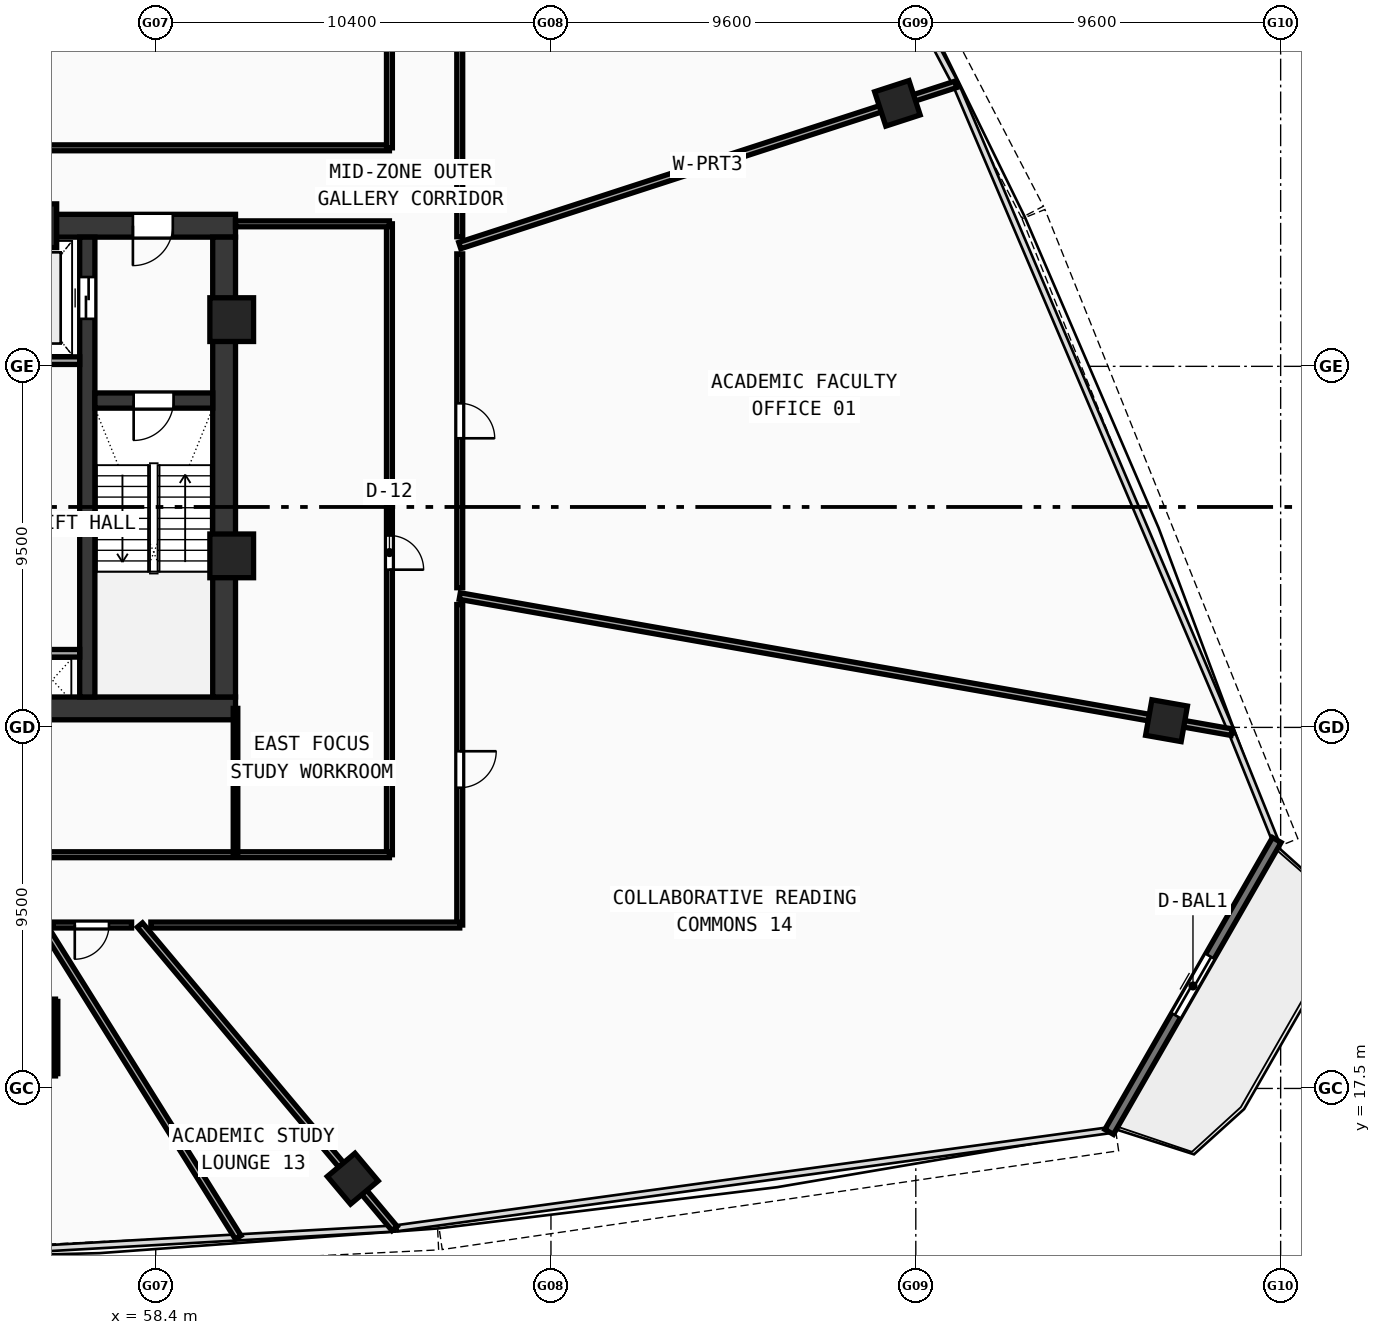
"""IFC4 building model, lengths in metres.
Left out: names, types, materials, properties, quantities, classifications, styles, units other than length and angle.
Written with IfcOpenShell. Run it as: python <this file> out.ifc"""

import sys

from ifc_helpers import new_model, si_unit, direction, frame, frame_2d, origin, origin_with_axes, origin_2d, place, context, subcontext, project, spatial, rectangle, hollow_rectangle, extrude, source, transform, mapped, element, fill, save


model = new_model("IFC4")
c1 = context("Model", 3, precision=1e-05, world=origin(), true_north=direction((0.0, 1.0)))
c2 = subcontext(c1, "Body", "Model", "MODEL_VIEW")
j1 = project(units=[si_unit("LENGTHUNIT", "METRE"), si_unit("PLANEANGLEUNIT", "RADIAN")], contexts=[c1])
p1 = place(None, origin())
s1 = spatial("IfcSite", under=j1, at=p1, CompositionType="ELEMENT")
p2 = place(p1, origin())
s2 = spatial("IfcBuilding", under=s1, at=p2, CompositionType="ELEMENT")
p3 = place(p2, frame((0.0, 0.0, 144.55)))
s3 = spatial("IfcBuildingStorey", under=s2, at=p3, CompositionType="ELEMENT", Elevation=144.55)
p4 = place(p3, frame((35.5, 27.5, 0.0), z_axis=(0.0, 0.0, 1.0), x_axis=(1.0, 0.0, 0.0)))
e1 = element("IfcWall", 1, at=p4, inside=s3, PredefinedType="SHEAR", context=c2, shape_type="SweptSolid", body=[
    extrude(rectangle(XDim=25.0, YDim=0.6, at=frame_2d((12.5, 0.0))), origin(), (0.0, 0.0, 1.0), 3.42),
])
p5 = place(p3, frame((49.2, 40.2, 0.0), z_axis=(0.0, 0.0, 1.0), x_axis=(1.0, 0.0, 0.0)))
e2 = element("IfcWall", 2, at=p5, inside=s3, PredefinedType="SHEAR", context=c2, shape_type="SweptSolid", body=[
    extrude(rectangle(XDim=11.3, YDim=0.6, at=frame_2d((5.65, 0.0))), origin(), (0.0, 0.0, 1.0), 3.42),
])
p6 = place(p5, frame((8.6, 0.0, 0.0)))
e3 = element("IfcOpeningElement", 3, at=p6, cuts=e2, PredefinedType="OPENING", context=c2, shape_type="SweptSolid", body=[
    extrude(rectangle(XDim=1.05, YDim=2.1, at=frame_2d((0.525, 1.05))), frame((0.0, 0.31, 0.0), z_axis=(0.0, -1.0, 0.0), x_axis=(1.0, 0.0, 0.0)), (0.0, 0.0, 1.0), 0.62),
])
p7 = place(p3, frame((60.2, 27.8, 0.0), z_axis=(0.0, 0.0, 1.0), x_axis=(0.0, 1.0, 0.0)))
e4 = element("IfcWall", 4, at=p7, inside=s3, PredefinedType="SHEAR", context=c2, shape_type="SweptSolid", body=[
    extrude(rectangle(XDim=12.1, YDim=0.6, at=frame_2d((6.05, 0.0))), origin(), (0.0, 0.0, 1.0), 3.42),
])
p8 = place(p3, frame((56.6, 27.8, 0.0), z_axis=(0.0, 0.0, 1.0), x_axis=(0.0, 1.0, 0.0)))
e5 = element("IfcWall", 5, at=p8, inside=s3, PredefinedType="SHEAR", context=c2, shape_type="SweptSolid", body=[
    extrude(rectangle(XDim=12.1, YDim=0.4, at=frame_2d((6.05, 0.0))), origin(), (0.0, 0.0, 1.0), 3.42),
])
p9 = place(p8, frame((9.95, 0.0, 0.0)))
e6 = element("IfcOpeningElement", 6, at=p9, cuts=e5, PredefinedType="OPENING", context=c2, shape_type="SweptSolid", body=[
    extrude(rectangle(XDim=1.1, YDim=2.1, at=frame_2d((0.55, 1.05))), frame((0.0, 0.21, 0.0), z_axis=(0.0, -1.0, 0.0), x_axis=(1.0, 0.0, 0.0)), (0.0, 0.0, 1.0), 0.42),
])
p10 = place(p3, frame((56.8, 35.6, 0.0), z_axis=(0.0, 0.0, 1.0), x_axis=(1.0, 0.0, 0.0)))
e7 = element("IfcWall", 7, at=p10, inside=s3, PredefinedType="SHEAR", context=c2, shape_type="SweptSolid", body=[
    extrude(rectangle(XDim=3.1, YDim=0.4, at=frame_2d((1.55, 0.0))), origin(), (0.0, 0.0, 1.0), 3.42),
])
p11 = place(p10, frame((1.02, 0.0, 0.0)))
e8 = element("IfcOpeningElement", 8, at=p11, cuts=e7, PredefinedType="OPENING", context=c2, shape_type="SweptSolid", body=[
    extrude(rectangle(XDim=1.05, YDim=2.1, at=frame_2d((0.525, 1.05))), frame((0.0, 0.21, 0.0), z_axis=(0.0, -1.0, 0.0), x_axis=(1.0, 0.0, 0.0)), (0.0, 0.0, 1.0), 0.42),
])
m1 = source(origin(), c2, "Body", "SweptSolid", [
    extrude(hollow_rectangle(XDim=1.15, YDim=1.15, WallThickness=0.048, at=origin_2d()), origin(), (0.0, 0.0, 1.0), 3.68),
])
for number, where, z_axis, x_axis in (
    (9, (60.4, 31.513, -0.26), (0.0, 0.0, 1.0), (1.0, 0.0, 0.0)),
    (10, (60.4, 37.729, -0.26), (0.0, 0.0, 1.0), (1.0, 0.0, 0.0)),
    (11, (55.219, 40.2, -0.26), (0.0, 0.0, 1.0), (1.0, 0.0, 0.0)),
):
    element("IfcColumn", number, at=place(p3, frame(where, z_axis=z_axis, x_axis=x_axis)), inside=s3, PredefinedType="COLUMN", context=c2, shape_type="MappedRepresentation", body=[
        mapped(m1, transform((0.0, 0.0, 0.0), scale=1.0)),
    ])
m2 = source(origin(), c2, "Body", "SweptSolid", [
    extrude(hollow_rectangle(XDim=0.95, YDim=0.95, WallThickness=0.04, at=origin_2d()), origin(), (0.0, 0.0, 1.0), 3.68),
])
for number, where, z_axis, x_axis in (
    (12, (63.585, 15.126, -0.26), (0.0, 0.0, 1.0), (0.766, 0.643, 0.0)),
    (13, (84.997, 27.177, -0.26), (0.0, 0.0, 1.0), (0.174, 0.985, 0.0)),
    (14, (77.915, 43.42, -0.26), (0.0, 0.0, 1.0), (-0.309, 0.951, 0.0)),
):
    element("IfcColumn", number, at=place(p3, frame(where, z_axis=z_axis, x_axis=x_axis)), inside=s3, PredefinedType="COLUMN", context=c2, shape_type="MappedRepresentation", body=[
        mapped(m2, transform((0.0, 0.0, 0.0), scale=1.0)),
    ])
p12 = place(p3, frame((83.488, 16.356, 0.0), z_axis=(0.0, 0.0, 1.0), x_axis=(0.497915888941, 0.867225326856, 0.0)))
e15 = element("IfcWall", 15, at=p12, inside=s3, PredefinedType="STANDARD", context=c2, shape_type="SweptSolid", body=[
    extrude(rectangle(XDim=8.858, YDim=0.26, at=frame_2d((4.429, 0.0))), origin(), (0.0, 0.0, 1.0), 3.42),
])
p13 = place(p12, frame((3.529, 0.0, 0.0)))
e16 = element("IfcOpeningElement", 16, at=p13, cuts=e15, PredefinedType="OPENING", context=c2, shape_type="SweptSolid", body=[
    extrude(rectangle(XDim=1.8, YDim=2.15, at=frame_2d((0.9, 1.075))), frame((0.0, 0.14, 0.0), z_axis=(0.0, -1.0, 0.0), x_axis=(1.0, 0.0, 0.0)), (0.0, 0.0, 1.0), 0.28),
])
p14 = place(p3, frame((53.68, 36.65, 0.0), z_axis=(0.0, 0.0, 1.0), x_axis=(1.0, 0.0, 0.0)))
e17 = element("IfcWall", 17, at=p14, inside=s3, PredefinedType="SOLIDWALL", context=c2, shape_type="SweptSolid", body=[
    extrude(rectangle(XDim=2.72, YDim=0.2, at=frame_2d((1.36, 0.0))), origin(), (0.0, 0.0, 1.0), 3.42),
])
p15 = place(p3, frame((55.12, 28.95, 0.0), z_axis=(0.0, 0.0, 1.0), x_axis=(1.0, 0.0, 0.0)))
e18 = element("IfcWall", 18, at=p15, inside=s3, PredefinedType="SOLIDWALL", context=c2, shape_type="SweptSolid", body=[
    extrude(rectangle(XDim=1.28, YDim=0.2, at=frame_2d((0.64, 0.0))), origin(), (0.0, 0.0, 1.0), 3.42),
])
p16 = place(p3, frame((31.45, 42.25, 0.0), z_axis=(0.0, 0.0, 1.0), x_axis=(1.0, 0.0, 0.0)))
e19 = element("IfcWall", 19, at=p16, inside=s3, PredefinedType="PARTITIONING", context=c2, shape_type="SweptSolid", body=[
    extrude(rectangle(XDim=33.1, YDim=0.155, at=frame_2d((16.55, 0.0))), origin(), (0.0, 0.0, 1.0), 2.77),
])
p17 = place(p3, frame((64.55, 42.25, 0.0), z_axis=(0.0, 0.0, 1.0), x_axis=(0.0, 1.0, 0.0)))
e20 = element("IfcWall", 20, at=p17, inside=s3, PredefinedType="PARTITIONING", context=c2, shape_type="SweptSolid", body=[
    extrude(rectangle(XDim=11.7, YDim=0.155, at=frame_2d((5.85, 0.0))), origin(), (0.0, 0.0, 1.0), 2.77),
])
p18 = place(p3, frame((64.55, 23.65, 0.0), z_axis=(0.0, 0.0, 1.0), x_axis=(0.0, 1.0, 0.0)))
e21 = element("IfcWall", 21, at=p18, inside=s3, PredefinedType="PARTITIONING", context=c2, shape_type="SweptSolid", body=[
    extrude(rectangle(XDim=16.6, YDim=0.155, at=frame_2d((8.3, 0.0))), origin(), (0.0, 0.0, 1.0), 2.77),
])
p19 = place(p18, frame((7.5, 0.0, 0.0)))
e22 = element("IfcOpeningElement", 22, at=p19, cuts=e21, PredefinedType="OPENING", context=c2, shape_type="SweptSolid", body=[
    extrude(rectangle(XDim=0.9, YDim=2.08, at=frame_2d((0.45, 1.04))), frame((0.0, 0.087, 0.0), z_axis=(0.0, -1.0, 0.0), x_axis=(1.0, 0.0, 0.0)), (0.0, 0.0, 1.0), 0.175),
])
p20 = place(p3, frame((31.45, 23.65, 0.0), z_axis=(0.0, 0.0, 1.0), x_axis=(1.0, 0.0, 0.0)))
e23 = element("IfcWall", 23, at=p20, inside=s3, PredefinedType="PARTITIONING", context=c2, shape_type="SweptSolid", body=[
    extrude(rectangle(XDim=33.1, YDim=0.155, at=frame_2d((16.55, 0.0))), origin(), (0.0, 0.0, 1.0), 2.77),
])
p21 = place(p20, frame((16.0, 0.0, 0.0)))
e24 = element("IfcOpeningElement", 24, at=p21, cuts=e23, PredefinedType="OPENING", context=c2, shape_type="SweptSolid", body=[
    extrude(rectangle(XDim=0.92, YDim=2.1, at=frame_2d((0.46, 1.05))), frame((0.0, 0.087, 0.0), z_axis=(0.0, -1.0, 0.0), x_axis=(1.0, 0.0, 0.0)), (0.0, 0.0, 1.0), 0.175),
])
p22 = place(p3, frame((60.5, 40.25, 0.0), z_axis=(0.0, 0.0, 1.0), x_axis=(1.0, 0.0, 0.0)))
e25 = element("IfcWall", 25, at=p22, inside=s3, PredefinedType="PARTITIONING", context=c2, shape_type="SweptSolid", body=[
    extrude(rectangle(XDim=4.05, YDim=0.155, at=frame_2d((2.025, 0.0))), origin(), (0.0, 0.0, 1.0), 3.42),
])
p23 = place(p3, frame((60.5, 23.65, 0.0), z_axis=(0.0, 0.0, 1.0), x_axis=(0.0, 1.0, 0.0)))
e26 = element("IfcWall", 26, at=p23, inside=s3, PredefinedType="PARTITIONING", context=c2, shape_type="SweptSolid", body=[
    extrude(rectangle(XDim=3.85, YDim=0.12, at=frame_2d((1.925, 0.0))), origin(), (0.0, 0.0, 1.0), 3.02),
])
p24 = place(p3, frame((66.4, 39.678, 0.0), z_axis=(0.0, 0.0, 1.0), x_axis=(0.951057598357, 0.309013664112, 0.0)))
e27 = element("IfcWall", 27, at=p24, inside=s3, PredefinedType="PARTITIONING", context=c2, shape_type="SweptSolid", body=[
    extrude(rectangle(XDim=13.723, YDim=0.175, at=frame_2d((6.862, 0.0))), origin(), (0.0, 0.0, 1.0), 2.77),
])
p25 = place(p3, frame((55.436, 21.8, 0.0), z_axis=(0.0, 0.0, 1.0), x_axis=(0.529931002604, -0.848040761096, 0.0)))
e28 = element("IfcWall", 28, at=p25, inside=s3, PredefinedType="PARTITIONING", context=c2, shape_type="SweptSolid", body=[
    extrude(rectangle(XDim=9.691, YDim=0.175, at=frame_2d((4.845, 0.0))), origin(), (0.0, 0.0, 1.0), 2.77),
])
p26 = place(p3, frame((57.985, 21.8, 0.0), z_axis=(0.0, 0.0, 1.0), x_axis=(0.642781677101, -0.76604942111, 0.0)))
e29 = element("IfcWall", 29, at=p26, inside=s3, PredefinedType="PARTITIONING", context=c2, shape_type="SweptSolid", body=[
    extrude(rectangle(XDim=10.424, YDim=0.175, at=frame_2d((5.212, 0.0))), origin(), (0.0, 0.0, 1.0), 2.77),
])
p27 = place(p3, frame((66.4, 30.456, 0.0), z_axis=(0.0, 0.0, 1.0), x_axis=(0.984807623882, -0.173648909998, 0.0)))
e30 = element("IfcWall", 30, at=p27, inside=s3, PredefinedType="PARTITIONING", context=c2, shape_type="SweptSolid", body=[
    extrude(rectangle(XDim=20.622, YDim=0.175, at=frame_2d((10.311, 0.0))), origin(), (0.0, 0.0, 1.0), 2.77),
])
p28 = place(p3, frame((66.4, 55.408, 0.0), z_axis=(0.0, 0.0, 1.0), x_axis=(0.0, -1.0, 0.0)))
e31 = element("IfcWall", 31, at=p28, inside=s3, PredefinedType="PARTITIONING", context=c2, shape_type="SweptSolid", body=[
    extrude(rectangle(XDim=15.499, YDim=0.155, at=frame_2d((7.749, 0.0))), origin(), (0.0, 0.0, 1.0), 2.77),
])
p29 = place(p28, frame((7.28, 0.0, 0.0)))
e32 = element("IfcOpeningElement", 32, at=p29, cuts=e31, PredefinedType="OPENING", context=c2, shape_type="SweptSolid", body=[
    extrude(rectangle(XDim=0.96, YDim=2.12, at=frame_2d((0.48, 1.06))), frame((0.0, 0.087, 0.0), z_axis=(0.0, -1.0, 0.0), x_axis=(1.0, 0.0, 0.0)), (0.0, 0.0, 1.0), 0.175),
])
p30 = place(p3, frame((66.4, 39.459, 0.0), z_axis=(0.0, 0.0, 1.0), x_axis=(0.0, -1.0, 0.0)))
e33 = element("IfcWall", 33, at=p30, inside=s3, PredefinedType="PARTITIONING", context=c2, shape_type="SweptSolid", body=[
    extrude(rectangle(XDim=8.783, YDim=0.155, at=frame_2d((4.392, 0.0))), origin(), (0.0, 0.0, 1.0), 3.42),
])
p31 = place(p30, frame((3.932, 0.0, 0.0)))
e34 = element("IfcOpeningElement", 34, at=p31, cuts=e33, PredefinedType="OPENING", context=c2, shape_type="SweptSolid", body=[
    extrude(rectangle(XDim=0.92, YDim=2.1, at=frame_2d((0.46, 1.05))), frame((0.0, 0.087, 0.0), z_axis=(0.0, -1.0, 0.0), x_axis=(1.0, 0.0, 0.0)), (0.0, 0.0, 1.0), 0.175),
])
p32 = place(p3, frame((66.4, 30.232, 0.0), z_axis=(0.0, 0.0, 1.0), x_axis=(0.0, -1.0, 0.0)))
e35 = element("IfcWall", 35, at=p32, inside=s3, PredefinedType="PARTITIONING", context=c2, shape_type="SweptSolid", body=[
    extrude(rectangle(XDim=8.432, YDim=0.155, at=frame_2d((4.216, 0.0))), origin(), (0.0, 0.0, 1.0), 3.02),
])
p33 = place(p32, frame((3.859, 0.0, 0.0)))
e36 = element("IfcOpeningElement", 36, at=p33, cuts=e35, PredefinedType="OPENING", context=c2, shape_type="SweptSolid", body=[
    extrude(rectangle(XDim=0.96, YDim=2.12, at=frame_2d((0.48, 1.06))), frame((0.0, 0.087, 0.0), z_axis=(0.0, -1.0, 0.0), x_axis=(1.0, 0.0, 0.0)), (0.0, 0.0, 1.0), 0.175),
])
p34 = place(p3, frame((66.4, 21.8, 0.0), z_axis=(0.0, 0.0, 1.0), x_axis=(-1.0, 0.0, 0.0)))
e37 = element("IfcWall", 37, at=p34, inside=s3, PredefinedType="PARTITIONING", context=c2, shape_type="SweptSolid", body=[
    extrude(rectangle(XDim=8.127, YDim=0.155, at=frame_2d((4.064, 0.0))), origin(), (0.0, 0.0, 1.0), 3.02),
])
p35 = place(p3, frame((57.765, 21.8, 0.0), z_axis=(0.0, 0.0, 1.0), x_axis=(-1.0, 0.0, 0.0)))
e38 = element("IfcWall", 38, at=p35, inside=s3, PredefinedType="PARTITIONING", context=c2, shape_type="SweptSolid", body=[
    extrude(rectangle(XDim=2.07, YDim=0.155, at=frame_2d((1.035, 0.0))), origin(), (0.0, 0.0, 1.0), 2.77),
])
p36 = place(p35, frame((0.595, 0.0, 0.0)))
e39 = element("IfcOpeningElement", 39, at=p36, cuts=e38, PredefinedType="OPENING", context=c2, shape_type="SweptSolid", body=[
    extrude(rectangle(XDim=0.9, YDim=2.08, at=frame_2d((0.45, 1.04))), frame((0.0, 0.087, 0.0), z_axis=(0.0, -1.0, 0.0), x_axis=(1.0, 0.0, 0.0)), (0.0, 0.0, 1.0), 0.175),
])
p37 = place(p3, frame((53.714, 17.89, 0.0), z_axis=(0.0, 0.0, 1.0), x_axis=(1.0, 0.0, 0.0)))
e40 = element("IfcWall", 40, at=p37, inside=s3, PredefinedType="PARTITIONING", context=c2, shape_type="SweptSolid", body=[
    extrude(rectangle(XDim=2.05, YDim=0.12, at=frame_2d((1.025, 0.0))), origin(), (0.0, 0.0, 1.0), 3.42),
])
p38 = place(p37, frame((0.6, 0.0, 0.0)))
e41 = element("IfcOpeningElement", 41, at=p38, cuts=e40, PredefinedType="OPENING", context=c2, shape_type="SweptSolid", body=[
    extrude(rectangle(XDim=0.85, YDim=2.1, at=frame_2d((0.425, 1.05))), frame((0.0, 0.07, 0.0), z_axis=(0.0, -1.0, 0.0), x_axis=(1.0, 0.0, 0.0)), (0.0, 0.0, 1.0), 0.14),
])
p39 = place(p3, frame((55.764, 17.89, 0.0), z_axis=(0.0, 0.0, 1.0), x_axis=(0.0, 1.0, 0.0)))
e42 = element("IfcWall", 42, at=p39, inside=s3, PredefinedType="PARTITIONING", context=c2, shape_type="SweptSolid", body=[
    extrude(rectangle(XDim=1.9, YDim=0.12, at=frame_2d((0.95, 0.0))), origin(), (0.0, 0.0, 1.0), 3.02),
])
p40 = place(p3, frame((55.764, 19.79, 0.0), z_axis=(0.0, 0.0, 1.0), x_axis=(-1.0, 0.0, 0.0)))
e43 = element("IfcWall", 43, at=p40, inside=s3, PredefinedType="PARTITIONING", context=c2, shape_type="SweptSolid", body=[
    extrude(rectangle(XDim=2.05, YDim=0.12, at=frame_2d((1.025, 0.0))), origin(), (0.0, 0.0, 1.0), 3.42),
])
m3 = source(origin(), c2, "Body", "SweptSolid", [
    extrude(rectangle(XDim=1.8, YDim=2.15, at=frame_2d((0.9, 1.075))), frame((0.0, 0.025, 0.0), z_axis=(0.0, -1.0, 0.0), x_axis=(1.0, 0.0, 0.0)), (0.0, 0.0, 1.0), 0.05),
])
p41 = place(p13, origin_with_axes())
e44 = element("IfcDoor", 44, at=p41, inside=s3, OperationType="DOUBLE_DOOR_SLIDING", PredefinedType="DOOR", context=c2, shape_type="MappedRepresentation", body=[
    mapped(m3, transform((0.0, 0.0, 0.0), scale=1.0)),
])
fill(e16, e44)
m4 = source(origin(), c2, "Body", "SweptSolid", [
    extrude(rectangle(XDim=1.05, YDim=2.1, at=frame_2d((0.525, 1.05))), frame((0.0, 0.025, 0.0), z_axis=(0.0, -1.0, 0.0), x_axis=(1.0, 0.0, 0.0)), (0.0, 0.0, 1.0), 0.05),
])
p42 = place(p11, frame((1.05, 0.0, 0.0), z_axis=(0.0, 0.0, 1.0), x_axis=(-1.0, 0.0, 0.0)))
e45 = element("IfcDoor", 45, at=p42, inside=s3, OperationType="SINGLE_SWING_RIGHT", PredefinedType="DOOR", context=c2, shape_type="MappedRepresentation", body=[
    mapped(m4, transform((0.0, 0.0, 0.0), scale=1.0)),
])
fill(e8, e45)
p43 = place(p6, frame((1.05, 0.0, 0.0), z_axis=(0.0, 0.0, 1.0), x_axis=(-1.0, 0.0, 0.0)))
e46 = element("IfcDoor", 46, at=p43, inside=s3, OperationType="SINGLE_SWING_RIGHT", PredefinedType="DOOR", context=c2, shape_type="MappedRepresentation", body=[
    mapped(m4, transform((0.0, 0.0, 0.0), scale=1.0)),
])
fill(e3, e46)
m5 = source(origin(), c2, "Body", "SweptSolid", [
    extrude(rectangle(XDim=1.1, YDim=2.1, at=frame_2d((0.55, 1.05))), frame((0.0, 0.025, 0.0), z_axis=(0.0, -1.0, 0.0), x_axis=(1.0, 0.0, 0.0)), (0.0, 0.0, 1.0), 0.05),
])
p44 = place(p9, origin_with_axes())
e47 = element("IfcDoor", 47, at=p44, inside=s3, OperationType="DOUBLE_DOOR_SLIDING", PredefinedType="DOOR", context=c2, shape_type="MappedRepresentation", body=[
    mapped(m5, transform((0.0, 0.0, 0.0), scale=1.0)),
])
fill(e6, e47)
m6 = source(origin(), c2, "Body", "SweptSolid", [
    extrude(rectangle(XDim=0.9, YDim=2.08, at=frame_2d((0.45, 1.04))), frame((0.0, 0.025, 0.0), z_axis=(0.0, -1.0, 0.0), x_axis=(1.0, 0.0, 0.0)), (0.0, 0.0, 1.0), 0.05),
])
p45 = place(p19, frame((0.9, 0.0, 0.0), z_axis=(0.0, 0.0, 1.0), x_axis=(-1.0, 0.0, 0.0)))
e48 = element("IfcDoor", 48, at=p45, inside=s3, OperationType="SINGLE_SWING_RIGHT", PredefinedType="DOOR", context=c2, shape_type="MappedRepresentation", body=[
    mapped(m6, transform((0.0, 0.0, 0.0), scale=1.0)),
])
fill(e22, e48)
m7 = source(origin(), c2, "Body", "SweptSolid", [
    extrude(rectangle(XDim=0.92, YDim=2.1, at=frame_2d((0.46, 1.05))), frame((0.0, 0.025, 0.0), z_axis=(0.0, -1.0, 0.0), x_axis=(1.0, 0.0, 0.0)), (0.0, 0.0, 1.0), 0.05),
])
p46 = place(p31, origin_with_axes())
e49 = element("IfcDoor", 49, at=p46, inside=s3, OperationType="SINGLE_SWING_RIGHT", PredefinedType="DOOR", context=c2, shape_type="MappedRepresentation", body=[
    mapped(m7, transform((0.0, 0.0, 0.0), scale=1.0)),
])
fill(e34, e49)
p47 = place(p36, origin_with_axes())
e50 = element("IfcDoor", 50, at=p47, inside=s3, OperationType="SINGLE_SWING_RIGHT", PredefinedType="DOOR", context=c2, shape_type="MappedRepresentation", body=[
    mapped(m6, transform((0.0, 0.0, 0.0), scale=1.0)),
])
fill(e39, e50)
m8 = source(origin(), c2, "Body", "SweptSolid", [
    extrude(rectangle(XDim=0.96, YDim=2.12, at=frame_2d((0.48, 1.06))), frame((0.0, 0.025, 0.0), z_axis=(0.0, -1.0, 0.0), x_axis=(1.0, 0.0, 0.0)), (0.0, 0.0, 1.0), 0.05),
])
p48 = place(p33, origin_with_axes())
e51 = element("IfcDoor", 51, at=p48, inside=s3, OperationType="SINGLE_SWING_LEFT", PredefinedType="DOOR", context=c2, shape_type="MappedRepresentation", body=[
    mapped(m8, transform((0.0, 0.0, 0.0), scale=1.0)),
])
fill(e36, e51)
save(model, sys.argv[1])
